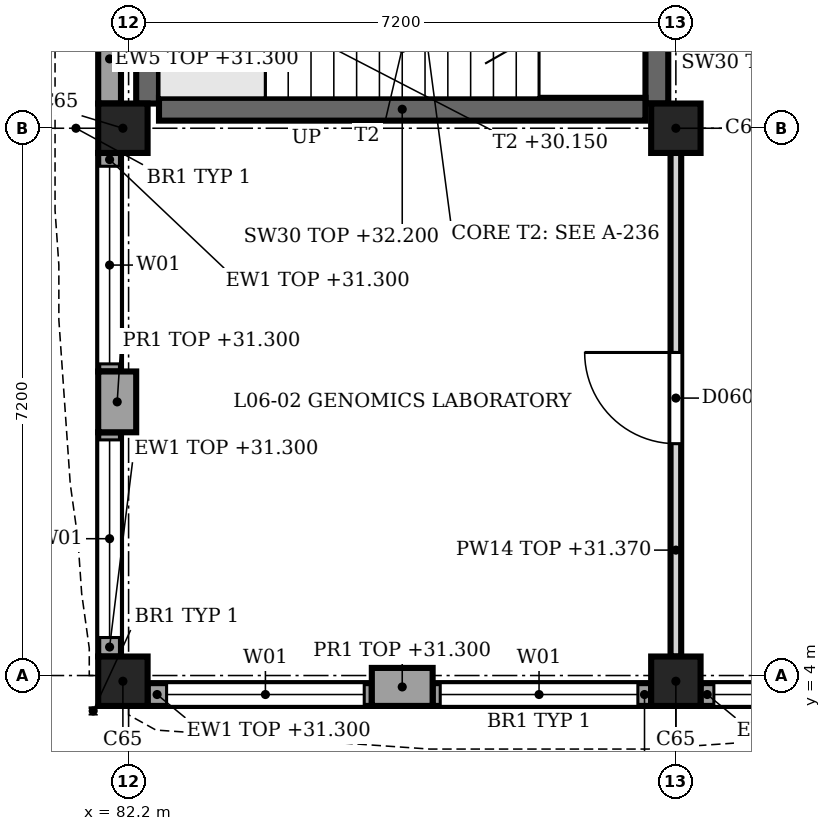
"""IFC4 building model, lengths in metres.
Left out: names, types, materials, properties, quantities, classifications, styles, units other than length and angle.
Written with IfcOpenShell. Run it as: python <this file> out.ifc"""

import sys

from ifc_helpers import new_model, si_unit, direction, frame, frame_2d, origin, origin_2d, place, context, subcontext, project, spatial, rectangle, extrude, element, fill, save


model = new_model("IFC4")
c1 = context("Model", 3, precision=1e-05, world=origin(), true_north=direction((0.0, 1.0)))
c2 = subcontext(c1, "Body", "Model", "MODEL_VIEW")
j1 = project(units=[si_unit("LENGTHUNIT", "METRE"), si_unit("PLANEANGLEUNIT", "RADIAN")], contexts=[c1])
p1 = place(None, origin())
s1 = spatial("IfcSite", under=j1, at=p1, CompositionType="ELEMENT")
p2 = place(p1, origin())
s2 = spatial("IfcBuilding", under=s1, at=p2, CompositionType="ELEMENT")
p3 = place(p2, frame((0.0, 0.0, 27.9)))
s3 = spatial("IfcBuildingStorey", under=s2, at=p3, CompositionType="ELEMENT", Elevation=27.9)
for number, where, z_axis, x_axis in (
    (1, (82.125, 3.925, 0.0), (0.0, 0.0, 1.0), (1.0, 0.0, 0.0)),
    (2, (82.125, 11.2, 0.0), (0.0, 0.0, 1.0), (1.0, 0.0, 0.0)),
    (3, (89.4, 3.925, 0.0), (0.0, 0.0, 1.0), (1.0, 0.0, 0.0)),
    (4, (89.4, 11.2, 0.0), (0.0, 0.0, 1.0), (1.0, 0.0, 0.0)),
):
    element("IfcColumn", number, at=place(p3, frame(where, z_axis=z_axis, x_axis=x_axis)), inside=s3, PredefinedType="COLUMN", context=c2, shape_type="SweptSolid", body=[
        extrude(rectangle(XDim=0.65, YDim=0.65, at=origin_2d()), origin(), (0.0, 0.0, 1.0), 4.5),
    ])
p4 = place(p3, frame((82.05, 7.2, 0.0), z_axis=(0.0, 0.0, 1.0), x_axis=(0.0, 1.0, 0.0)))
e5 = element("IfcWall", 5, at=p4, inside=s3, PredefinedType="SOLIDWALL", context=c2, shape_type="SweptSolid", body=[
    extrude(rectangle(XDim=0.8, YDim=0.5, at=frame_2d((0.4, 0.0))), origin(), (0.0, 0.0, 1.0), 3.4),
])
p5 = place(p3, frame((81.95, 4.25, 0.0), z_axis=(0.0, 0.0, 1.0), x_axis=(0.0, 1.0, 0.0)))
e6 = element("IfcWall", 6, at=p5, inside=s3, PredefinedType="SOLIDWALL", context=c2, shape_type="SweptSolid", body=[
    extrude(rectangle(XDim=2.95, YDim=0.3, at=frame_2d((1.475, 0.0))), origin(), (0.0, 0.0, 1.0), 3.4),
])
p6 = place(p5, frame((0.25, 0.0, 0.9)))
e7 = element("IfcOpeningElement", 7, at=p6, cuts=e6, PredefinedType="OPENING", context=c2, shape_type="SweptSolid", body=[
    extrude(rectangle(XDim=2.6, YDim=2.4, at=frame_2d((1.3, 1.2))), frame((0.0, 0.16, 0.0), z_axis=(0.0, -1.0, 0.0), x_axis=(1.0, 0.0, 0.0)), (0.0, 0.0, 1.0), 0.32),
])
p7 = place(p3, frame((81.95, 8.0, 0.0), z_axis=(0.0, 0.0, 1.0), x_axis=(0.0, 1.0, 0.0)))
e8 = element("IfcWall", 8, at=p7, inside=s3, PredefinedType="SOLIDWALL", context=c2, shape_type="SweptSolid", body=[
    extrude(rectangle(XDim=2.875, YDim=0.3, at=frame_2d((1.438, 0.0))), origin(), (0.0, 0.0, 1.0), 3.4),
])
p8 = place(p7, frame((0.1, 0.0, 0.9)))
e9 = element("IfcOpeningElement", 9, at=p8, cuts=e8, PredefinedType="OPENING", context=c2, shape_type="SweptSolid", body=[
    extrude(rectangle(XDim=2.6, YDim=2.4, at=frame_2d((1.3, 1.2))), frame((0.0, 0.16, 0.0), z_axis=(0.0, -1.0, 0.0), x_axis=(1.0, 0.0, 0.0)), (0.0, 0.0, 1.0), 0.32),
])
p9 = place(p3, frame((81.95, 11.525, 0.0), z_axis=(0.0, 0.0, 1.0), x_axis=(0.0, 1.0, 0.0)))
e10 = element("IfcWall", 10, at=p9, inside=s3, PredefinedType="SOLIDWALL", context=c2, shape_type="SweptSolid", body=[
    extrude(rectangle(XDim=2.875, YDim=0.3, at=frame_2d((1.438, 0.0))), origin(), (0.0, 0.0, 1.0), 3.4),
])
p10 = place(p9, frame((1.175, 0.0, 1.2)))
e11 = element("IfcOpeningElement", 11, at=p10, cuts=e10, PredefinedType="OPENING", context=c2, shape_type="SweptSolid", body=[
    extrude(rectangle(XDim=0.6, YDim=1.8, at=frame_2d((0.3, 0.9))), frame((0.0, 0.16, 0.0), z_axis=(0.0, -1.0, 0.0), x_axis=(1.0, 0.0, 0.0)), (0.0, 0.0, 1.0), 0.32),
])
p11 = place(p3, frame((86.2, 3.85, 0.0), z_axis=(0.0, 0.0, 1.0), x_axis=(-1.0, 0.0, 0.0)))
e12 = element("IfcWall", 12, at=p11, inside=s3, PredefinedType="SOLIDWALL", context=c2, shape_type="SweptSolid", body=[
    extrude(rectangle(XDim=0.8, YDim=0.5, at=frame_2d((0.4, 0.0))), origin(), (0.0, 0.0, 1.0), 3.4),
])
p12 = place(p3, frame((92.6, 3.75, 0.0), z_axis=(0.0, 0.0, 1.0), x_axis=(-1.0, 0.0, 0.0)))
e13 = element("IfcWall", 13, at=p12, inside=s3, PredefinedType="SOLIDWALL", context=c2, shape_type="SweptSolid", body=[
    extrude(rectangle(XDim=2.875, YDim=0.3, at=frame_2d((1.438, 0.0))), origin(), (0.0, 0.0, 1.0), 3.4),
])
p13 = place(p12, frame((0.1, 0.0, 0.9)))
e14 = element("IfcOpeningElement", 14, at=p13, cuts=e13, PredefinedType="OPENING", context=c2, shape_type="SweptSolid", body=[
    extrude(rectangle(XDim=2.6, YDim=2.4, at=frame_2d((1.3, 1.2))), frame((0.0, 0.16, 0.0), z_axis=(0.0, -1.0, 0.0), x_axis=(1.0, 0.0, 0.0)), (0.0, 0.0, 1.0), 0.32),
])
p14 = place(p3, frame((89.075, 3.75, 0.0), z_axis=(0.0, 0.0, 1.0), x_axis=(-1.0, 0.0, 0.0)))
e15 = element("IfcWall", 15, at=p14, inside=s3, PredefinedType="SOLIDWALL", context=c2, shape_type="SweptSolid", body=[
    extrude(rectangle(XDim=2.875, YDim=0.3, at=frame_2d((1.438, 0.0))), origin(), (0.0, 0.0, 1.0), 3.4),
])
p15 = place(p14, frame((0.175, 0.0, 0.9)))
e16 = element("IfcOpeningElement", 16, at=p15, cuts=e15, PredefinedType="OPENING", context=c2, shape_type="SweptSolid", body=[
    extrude(rectangle(XDim=2.6, YDim=2.4, at=frame_2d((1.3, 1.2))), frame((0.0, 0.16, 0.0), z_axis=(0.0, -1.0, 0.0), x_axis=(1.0, 0.0, 0.0)), (0.0, 0.0, 1.0), 0.32),
])
p16 = place(p3, frame((85.4, 3.75, 0.0), z_axis=(0.0, 0.0, 1.0), x_axis=(-1.0, 0.0, 0.0)))
e17 = element("IfcWall", 17, at=p16, inside=s3, PredefinedType="SOLIDWALL", context=c2, shape_type="SweptSolid", body=[
    extrude(rectangle(XDim=2.95, YDim=0.3, at=frame_2d((1.475, 0.0))), origin(), (0.0, 0.0, 1.0), 3.4),
])
p17 = place(p16, frame((0.1, 0.0, 0.9)))
e18 = element("IfcOpeningElement", 18, at=p17, cuts=e17, PredefinedType="OPENING", context=c2, shape_type="SweptSolid", body=[
    extrude(rectangle(XDim=2.6, YDim=2.4, at=frame_2d((1.3, 1.2))), frame((0.0, 0.16, 0.0), z_axis=(0.0, -1.0, 0.0), x_axis=(1.0, 0.0, 0.0)), (0.0, 0.0, 1.0), 0.32),
])
p18 = place(p3, frame((89.15, 11.525, 0.0), z_axis=(0.0, 0.0, 1.0), x_axis=(0.0, 1.0, 0.0)))
e19 = element("IfcWall", 19, at=p18, inside=s3, PredefinedType="SHEAR", context=c2, shape_type="SweptSolid", body=[
    extrude(rectangle(XDim=6.55, YDim=0.3, at=frame_2d((3.275, 0.0))), origin(), (0.0, 0.0, 1.0), 4.3),
])
p19 = place(p18, frame((4.275, 0.0, 0.0)))
e20 = element("IfcOpeningElement", 20, at=p19, cuts=e19, PredefinedType="OPENING", context=c2, shape_type="SweptSolid", body=[
    extrude(rectangle(XDim=1.2, YDim=2.1, at=frame_2d((0.6, 1.05))), frame((0.0, 0.16, 0.0), z_axis=(0.0, -1.0, 0.0), x_axis=(1.0, 0.0, 0.0)), (0.0, 0.0, 1.0), 0.32),
])
p20 = place(p3, frame((82.45, 11.525, 0.0), z_axis=(0.0, 0.0, 1.0), x_axis=(0.0, 1.0, 0.0)))
e21 = element("IfcWall", 21, at=p20, inside=s3, PredefinedType="SHEAR", context=c2, shape_type="SweptSolid", body=[
    extrude(rectangle(XDim=6.55, YDim=0.3, at=frame_2d((3.275, 0.0))), origin(), (0.0, 0.0, 1.0), 4.3),
])
p21 = place(p20, frame((1.175, 0.0, 1.2)))
e22 = element("IfcOpeningElement", 22, at=p21, cuts=e21, PredefinedType="OPENING", context=c2, shape_type="SweptSolid", body=[
    extrude(rectangle(XDim=0.6, YDim=1.8, at=frame_2d((0.3, 0.9))), frame((0.0, 0.16, 0.0), z_axis=(0.0, -1.0, 0.0), x_axis=(1.0, 0.0, 0.0)), (0.0, 0.0, 1.0), 0.32),
])
p22 = place(p3, frame((82.6, 11.45, 0.0), z_axis=(0.0, 0.0, 1.0), x_axis=(1.0, 0.0, 0.0)))
e23 = element("IfcWall", 23, at=p22, inside=s3, PredefinedType="SHEAR", context=c2, shape_type="SweptSolid", body=[
    extrude(rectangle(XDim=6.4, YDim=0.3, at=frame_2d((3.2, 0.0))), origin(), (0.0, 0.0, 1.0), 4.3),
])
p23 = place(p3, frame((89.4, 4.25, 0.0), z_axis=(0.0, 0.0, 1.0), x_axis=(0.0, 1.0, 0.0)))
e24 = element("IfcWall", 24, at=p23, inside=s3, PredefinedType="PARTITIONING", context=c2, shape_type="SweptSolid", body=[
    extrude(rectangle(XDim=6.625, YDim=0.14, at=frame_2d((3.312, 0.0))), origin(), (0.0, 0.0, 1.0), 3.47),
])
p24 = place(p23, frame((2.8, 0.0, 0.0)))
e25 = element("IfcOpeningElement", 25, at=p24, cuts=e24, PredefinedType="OPENING", context=c2, shape_type="SweptSolid", body=[
    extrude(rectangle(XDim=1.2, YDim=2.1, at=frame_2d((0.6, 1.05))), frame((0.0, 0.08, 0.0), z_axis=(0.0, -1.0, 0.0), x_axis=(1.0, 0.0, 0.0)), (0.0, 0.0, 1.0), 0.16),
])
p25 = place(p6, origin())
e26 = element("IfcWindow", 26, at=p25, inside=s3, PartitioningType="SINGLE_PANEL", PredefinedType="WINDOW", context=c2, shape_type="SweptSolid", body=[
    extrude(rectangle(XDim=2.6, YDim=2.4, at=frame_2d((1.3, 1.2))), frame((0.0, 0.03, 0.0), z_axis=(0.0, -1.0, 0.0), x_axis=(1.0, 0.0, 0.0)), (0.0, 0.0, 1.0), 0.06),
])
fill(e7, e26)
p26 = place(p8, origin())
e27 = element("IfcWindow", 27, at=p26, inside=s3, PartitioningType="SINGLE_PANEL", PredefinedType="WINDOW", context=c2, shape_type="SweptSolid", body=[
    extrude(rectangle(XDim=2.6, YDim=2.4, at=frame_2d((1.3, 1.2))), frame((0.0, 0.03, 0.0), z_axis=(0.0, -1.0, 0.0), x_axis=(1.0, 0.0, 0.0)), (0.0, 0.0, 1.0), 0.06),
])
fill(e9, e27)
p27 = place(p13, origin())
e28 = element("IfcWindow", 28, at=p27, inside=s3, PartitioningType="SINGLE_PANEL", PredefinedType="WINDOW", context=c2, shape_type="SweptSolid", body=[
    extrude(rectangle(XDim=2.6, YDim=2.4, at=frame_2d((1.3, 1.2))), frame((0.0, 0.03, 0.0), z_axis=(0.0, -1.0, 0.0), x_axis=(1.0, 0.0, 0.0)), (0.0, 0.0, 1.0), 0.06),
])
fill(e14, e28)
p28 = place(p15, origin())
e29 = element("IfcWindow", 29, at=p28, inside=s3, PartitioningType="SINGLE_PANEL", PredefinedType="WINDOW", context=c2, shape_type="SweptSolid", body=[
    extrude(rectangle(XDim=2.6, YDim=2.4, at=frame_2d((1.3, 1.2))), frame((0.0, 0.03, 0.0), z_axis=(0.0, -1.0, 0.0), x_axis=(1.0, 0.0, 0.0)), (0.0, 0.0, 1.0), 0.06),
])
fill(e16, e29)
p29 = place(p17, origin())
e30 = element("IfcWindow", 30, at=p29, inside=s3, PartitioningType="SINGLE_PANEL", PredefinedType="WINDOW", context=c2, shape_type="SweptSolid", body=[
    extrude(rectangle(XDim=2.6, YDim=2.4, at=frame_2d((1.3, 1.2))), frame((0.0, 0.03, 0.0), z_axis=(0.0, -1.0, 0.0), x_axis=(1.0, 0.0, 0.0)), (0.0, 0.0, 1.0), 0.06),
])
fill(e18, e30)
p30 = place(p24, origin())
e31 = element("IfcDoor", 31, at=p30, inside=s3, OperationType="SINGLE_SWING_RIGHT", PredefinedType="DOOR", context=c2, shape_type="SweptSolid", body=[
    extrude(rectangle(XDim=1.2, YDim=2.1, at=frame_2d((0.6, 1.05))), frame((0.0, 0.025, 0.0), z_axis=(0.0, -1.0, 0.0), x_axis=(1.0, 0.0, 0.0)), (0.0, 0.0, 1.0), 0.05),
])
fill(e25, e31)
save(model, sys.argv[1])
